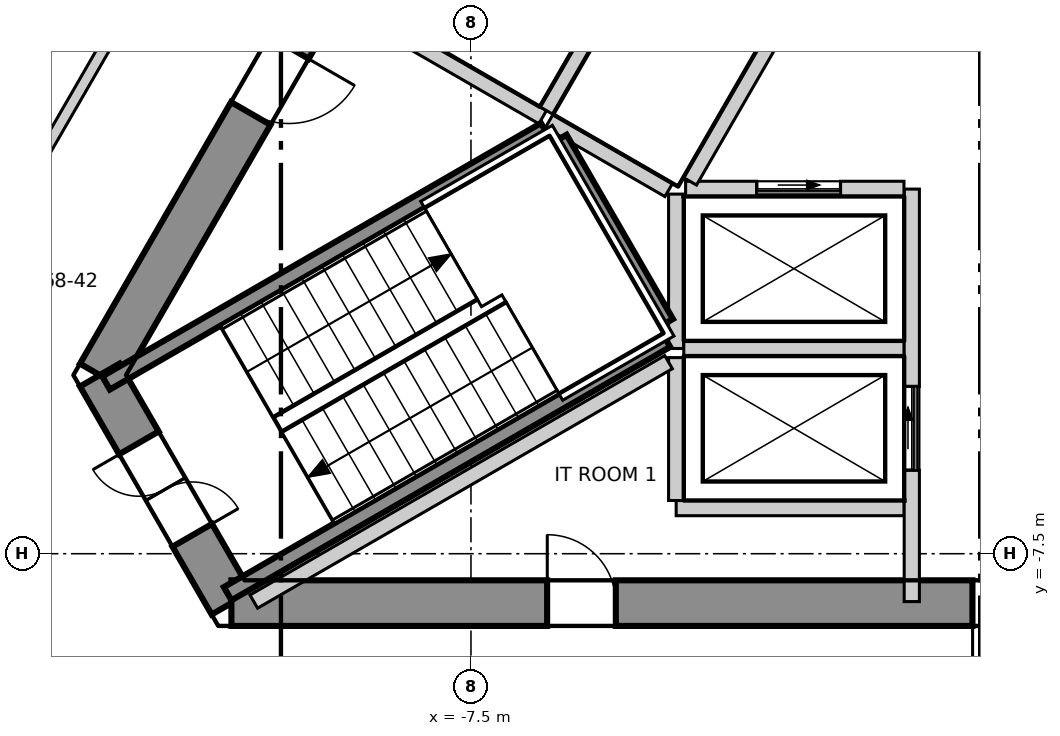
"""IFC4 building model, lengths in metres.
Left out: names, types, materials, properties, quantities, classifications, styles, units other than length and angle.
Written with IfcOpenShell. Run it as: python <this file> out.ifc"""

import sys

from ifc_helpers import new_model, si_unit, direction, frame, frame_2d, origin, place, context, subcontext, project, spatial, polyline, rectangle, outline, extrude, element, fill, save


model = new_model("IFC4")
c1 = context("Model", 3, precision=1e-05, world=origin(), true_north=direction((0.0, 1.0)))
c2 = subcontext(c1, "Body", "Model", "MODEL_VIEW")
j1 = project(units=[si_unit("LENGTHUNIT", "METRE"), si_unit("PLANEANGLEUNIT", "RADIAN")], contexts=[c1])
p1 = place(None, origin())
s1 = spatial("IfcSite", under=j1, at=p1, CompositionType="ELEMENT")
p2 = place(p1, origin())
s2 = spatial("IfcBuilding", under=s1, at=p2, CompositionType="ELEMENT")
p3 = place(p2, frame((0.0, 0.0, 289.9)))
s3 = spatial("IfcBuildingStorey", under=s2, at=p3, CompositionType="ELEMENT", Elevation=289.9)
p4 = place(p3, frame((-1.732, 13.3, -0.3), z_axis=(0.0, 0.0, 1.0), x_axis=(-0.500000539815, -0.866025092122, 0.0)))
e1 = element("IfcWall", 1, at=p4, inside=s3, PredefinedType="SHEAR", context=c2, shape_type="SweptSolid", body=[
    extrude(outline(polyline([(-0.173, -0.3), (1.795, -0.3), (3.763, -0.3), (5.732, -0.3), (7.7, -0.3), (9.668, -0.301), (11.637, -0.301), (13.605, -0.301), (15.573, -0.301), (17.542, -0.301), (19.51, -0.301), (21.478, -0.301), (21.131, 0.3), (19.226, 0.3), (17.321, 0.3), (15.415, 0.3), (13.51, 0.3), (11.605, 0.3), (9.699, 0.3), (7.794, 0.3), (5.889, 0.3), (3.984, 0.3), (2.078, 0.3), (0.173, 0.3), (-0.173, -0.3)])), origin(), (0.0, 0.0, 1.0), 3.6),
])
p5 = place(p4, frame((10.102, 0.0, 0.3)))
e2 = element("IfcOpeningElement", 2, at=p5, cuts=e1, PredefinedType="OPENING", context=c2, shape_type="SweptSolid", body=[
    extrude(rectangle(XDim=1.1, YDim=2.1, at=frame_2d((0.55, 1.05))), frame((0.0, 0.31, 0.0), z_axis=(0.0, -1.0, 0.0), x_axis=(1.0, 0.0, 0.0)), (0.0, 0.0, 1.0), 0.621),
])
p6 = place(p4, frame((16.328, 0.0, 0.3)))
e3 = element("IfcOpeningElement", 3, at=p6, cuts=e1, PredefinedType="OPENING", context=c2, shape_type="SweptSolid", body=[
    extrude(rectangle(XDim=1.0, YDim=2.1, at=frame_2d((0.5, 1.05))), frame((0.0, 0.31, 0.0), z_axis=(0.0, -1.0, 0.0), x_axis=(1.0, 0.0, 0.0)), (0.0, 0.0, 1.0), 0.621),
])
p7 = place(p4, frame((4.777, 0.0, 0.3)))
e4 = element("IfcOpeningElement", 4, at=p7, cuts=e1, PredefinedType="OPENING", context=c2, shape_type="SweptSolid", body=[
    extrude(rectangle(XDim=0.9, YDim=2.1, at=frame_2d((0.45, 1.05))), frame((0.0, 0.31, 0.0), z_axis=(0.0, -1.0, 0.0), x_axis=(1.0, 0.0, 0.0)), (0.0, 0.0, 1.0), 0.621),
])
p8 = place(p3, frame((-12.384, -5.15, -0.3), z_axis=(0.0, 0.0, 1.0), x_axis=(0.49997462182, -0.866040055388, 0.0)))
e5 = element("IfcWall", 5, at=p8, inside=s3, PredefinedType="SHEAR", context=c2, shape_type="SweptSolid", body=[
    extrude(outline(polyline([(-0.173, -0.301), (1.732, -0.301), (3.637, -0.3), (3.291, 0.3), (1.732, 0.3), (0.173, 0.3), (-0.173, -0.301)])), origin(), (0.0, 0.0, 1.0), 3.6),
])
p9 = place(p8, frame((1.032, 0.0, 0.3)))
e6 = element("IfcOpeningElement", 6, at=p9, cuts=e5, PredefinedType="OPENING", context=c2, shape_type="SweptSolid", body=[
    extrude(rectangle(XDim=1.4, YDim=2.1, at=frame_2d((0.7, 1.05))), frame((0.0, 0.31, 0.0), z_axis=(0.0, -1.0, 0.0), x_axis=(1.0, 0.0, 0.0)), (0.0, 0.0, 1.0), 0.621),
])
p10 = place(p3, frame((-10.652, -8.15, -0.3), z_axis=(0.0, 0.0, 1.0), x_axis=(1.0, 0.0, 0.0)))
e7 = element("IfcWall", 7, at=p10, inside=s3, PredefinedType="SHEAR", context=c2, shape_type="SweptSolid", body=[
    extrude(outline(polyline([(-0.173, -0.3), (1.795, -0.3), (3.763, -0.3), (5.731, -0.3), (7.7, -0.3), (9.668, -0.3), (11.636, -0.3), (13.604, -0.3), (15.573, -0.3), (17.541, -0.3), (19.509, -0.3), (21.477, -0.3), (21.131, 0.3), (19.226, 0.3), (17.321, 0.3), (15.415, 0.3), (13.51, 0.3), (11.605, 0.3), (9.699, 0.3), (7.794, 0.3), (5.889, 0.3), (3.984, 0.3), (2.078, 0.3), (0.173, 0.3), (-0.173, -0.3)])), origin(), (0.0, 0.0, 1.0), 3.6),
])
p11 = place(p10, frame((9.752, 0.0, 0.3)))
e8 = element("IfcOpeningElement", 8, at=p11, cuts=e7, PredefinedType="OPENING", context=c2, shape_type="SweptSolid", body=[
    extrude(rectangle(XDim=1.8, YDim=2.1, at=frame_2d((0.9, 1.05))), frame((0.0, 0.31, 0.0), z_axis=(0.0, -1.0, 0.0), x_axis=(1.0, 0.0, 0.0)), (0.0, 0.0, 1.0), 0.62),
])
p12 = place(p10, frame((4.156, 0.0, 0.3)))
e9 = element("IfcOpeningElement", 9, at=p12, cuts=e7, PredefinedType="OPENING", context=c2, shape_type="SweptSolid", body=[
    extrude(rectangle(XDim=0.9, YDim=2.1, at=frame_2d((0.45, 1.05))), frame((0.0, 0.31, 0.0), z_axis=(0.0, -1.0, 0.0), x_axis=(1.0, 0.0, 0.0)), (0.0, 0.0, 1.0), 0.62),
])
p13 = place(p3, frame((-2.494, 27.86, 0.0), z_axis=(0.0, 0.0, 1.0), x_axis=(-0.500008134474, -0.866020707292, 0.0)))
e10 = element("IfcWall", 10, at=p13, inside=s3, PredefinedType="ELEMENTEDWALL", context=c2, shape_type="SweptSolid", body=[
    extrude(rectangle(XDim=45.741, YDim=0.2, at=frame_2d((22.871, 0.0))), origin(), (0.0, 0.0, 1.0), 3.3),
])
p14 = place(p13, frame((2.15, 0.0, 0.9)))
e11 = element("IfcOpeningElement", 11, at=p14, cuts=e10, PredefinedType="OPENING", context=c2, shape_type="SweptSolid", body=[
    extrude(rectangle(XDim=3.7, YDim=2.2, at=frame_2d((1.85, 1.1))), frame((0.0, 0.11, 0.0), z_axis=(0.0, -1.0, 0.0), x_axis=(1.0, 0.0, 0.0)), (0.0, 0.0, 1.0), 0.22),
])
p15 = place(p13, frame((7.544, 0.0, 0.9)))
e12 = element("IfcOpeningElement", 12, at=p15, cuts=e10, PredefinedType="OPENING", context=c2, shape_type="SweptSolid", body=[
    extrude(rectangle(XDim=3.7, YDim=2.2, at=frame_2d((1.85, 1.1))), frame((0.0, 0.11, 0.0), z_axis=(0.0, -1.0, 0.0), x_axis=(1.0, 0.0, 0.0)), (0.0, 0.0, 1.0), 0.22),
])
p16 = place(p13, frame((12.939, 0.0, 0.9)))
e13 = element("IfcOpeningElement", 13, at=p16, cuts=e10, PredefinedType="OPENING", context=c2, shape_type="SweptSolid", body=[
    extrude(rectangle(XDim=3.7, YDim=2.2, at=frame_2d((1.85, 1.1))), frame((0.0, 0.11, 0.0), z_axis=(0.0, -1.0, 0.0), x_axis=(1.0, 0.0, 0.0)), (0.0, 0.0, 1.0), 0.22),
])
p17 = place(p13, frame((18.333, 0.0, 0.9)))
e14 = element("IfcOpeningElement", 14, at=p17, cuts=e10, PredefinedType="OPENING", context=c2, shape_type="SweptSolid", body=[
    extrude(rectangle(XDim=3.7, YDim=2.2, at=frame_2d((1.85, 1.1))), frame((0.0, 0.11, 0.0), z_axis=(0.0, -1.0, 0.0), x_axis=(1.0, 0.0, 0.0)), (0.0, 0.0, 1.0), 0.22),
])
p18 = place(p13, frame((23.728, 0.0, 0.9)))
e15 = element("IfcOpeningElement", 15, at=p18, cuts=e10, PredefinedType="OPENING", context=c2, shape_type="SweptSolid", body=[
    extrude(rectangle(XDim=3.7, YDim=2.2, at=frame_2d((1.85, 1.1))), frame((0.0, 0.11, 0.0), z_axis=(0.0, -1.0, 0.0), x_axis=(1.0, 0.0, 0.0)), (0.0, 0.0, 1.0), 0.22),
])
p19 = place(p13, frame((29.122, 0.0, 0.9)))
e16 = element("IfcOpeningElement", 16, at=p19, cuts=e10, PredefinedType="OPENING", context=c2, shape_type="SweptSolid", body=[
    extrude(rectangle(XDim=3.7, YDim=2.2, at=frame_2d((1.85, 1.1))), frame((0.0, 0.11, 0.0), z_axis=(0.0, -1.0, 0.0), x_axis=(1.0, 0.0, 0.0)), (0.0, 0.0, 1.0), 0.22),
])
p20 = place(p13, frame((34.517, 0.0, 0.9)))
e17 = element("IfcOpeningElement", 17, at=p20, cuts=e10, PredefinedType="OPENING", context=c2, shape_type="SweptSolid", body=[
    extrude(rectangle(XDim=3.7, YDim=2.2, at=frame_2d((1.85, 1.1))), frame((0.0, 0.11, 0.0), z_axis=(0.0, -1.0, 0.0), x_axis=(1.0, 0.0, 0.0)), (0.0, 0.0, 1.0), 0.22),
])
p21 = place(p13, frame((39.911, 0.0, 0.9)))
e18 = element("IfcOpeningElement", 18, at=p21, cuts=e10, PredefinedType="OPENING", context=c2, shape_type="SweptSolid", body=[
    extrude(rectangle(XDim=3.7, YDim=2.2, at=frame_2d((1.85, 1.1))), frame((0.0, 0.11, 0.0), z_axis=(0.0, -1.0, 0.0), x_axis=(1.0, 0.0, 0.0)), (0.0, 0.0, 1.0), 0.22),
])
p22 = place(p3, frame((-17.679, -10.12, 0.0), z_axis=(0.0, 0.0, 1.0), x_axis=(0.500008955215, 0.866020233427, 0.0)))
e19 = element("IfcWall", 19, at=p22, inside=s3, PredefinedType="PARTITIONING", context=c2, shape_type="SweptSolid", body=[
    extrude(rectangle(XDim=35.357, YDim=0.15, at=frame_2d((17.679, 0.0))), origin(), (0.0, 0.0, 1.0), 3.3),
])
p23 = place(p22, frame((31.407, 0.0, 0.0)))
e20 = element("IfcOpeningElement", 20, at=p23, cuts=e19, PredefinedType="OPENING", context=c2, shape_type="SweptSolid", body=[
    extrude(rectangle(XDim=1.0, YDim=2.1, at=frame_2d((0.5, 1.05))), frame((0.0, 0.085, 0.0), z_axis=(0.0, -1.0, 0.0), x_axis=(1.0, 0.0, 0.0)), (0.0, 0.0, 1.0), 0.17),
])
p24 = place(p22, frame((25.642, 0.0, 0.0)))
e21 = element("IfcOpeningElement", 21, at=p24, cuts=e19, PredefinedType="OPENING", context=c2, shape_type="SweptSolid", body=[
    extrude(rectangle(XDim=1.0, YDim=2.1, at=frame_2d((0.5, 1.05))), frame((0.0, 0.085, 0.0), z_axis=(0.0, -1.0, 0.0), x_axis=(1.0, 0.0, 0.0)), (0.0, 0.0, 1.0), 0.17),
])
p25 = place(p22, frame((18.348, 0.0, 0.0)))
e22 = element("IfcOpeningElement", 22, at=p25, cuts=e19, PredefinedType="OPENING", context=c2, shape_type="SweptSolid", body=[
    extrude(rectangle(XDim=1.0, YDim=2.1, at=frame_2d((0.5, 1.05))), frame((0.0, 0.085, 0.0), z_axis=(0.0, -1.0, 0.0), x_axis=(1.0, 0.0, 0.0)), (0.0, 0.0, 1.0), 0.17),
])
p26 = place(p22, frame((13.254, 0.0, 0.0)))
e23 = element("IfcOpeningElement", 23, at=p26, cuts=e19, PredefinedType="OPENING", context=c2, shape_type="SweptSolid", body=[
    extrude(rectangle(XDim=1.0, YDim=2.1, at=frame_2d((0.5, 1.05))), frame((0.0, 0.085, 0.0), z_axis=(0.0, -1.0, 0.0), x_axis=(1.0, 0.0, 0.0)), (0.0, 0.0, 1.0), 0.17),
])
p27 = place(p22, frame((7.559, 0.0, 0.0)))
e24 = element("IfcOpeningElement", 24, at=p27, cuts=e19, PredefinedType="OPENING", context=c2, shape_type="SweptSolid", body=[
    extrude(rectangle(XDim=1.0, YDim=2.1, at=frame_2d((0.5, 1.05))), frame((0.0, 0.085, 0.0), z_axis=(0.0, -1.0, 0.0), x_axis=(1.0, 0.0, 0.0)), (0.0, 0.0, 1.0), 0.17),
])
p28 = place(p22, frame((2.865, 0.0, 0.0)))
e25 = element("IfcOpeningElement", 25, at=p28, cuts=e19, PredefinedType="OPENING", context=c2, shape_type="SweptSolid", body=[
    extrude(rectangle(XDim=1.0, YDim=2.1, at=frame_2d((0.5, 1.05))), frame((0.0, 0.085, 0.0), z_axis=(0.0, -1.0, 0.0), x_axis=(1.0, 0.0, 0.0)), (0.0, 0.0, 1.0), 0.17),
])
p29 = place(p3, frame((-8.376, -0.707, 0.0), z_axis=(0.0, 0.0, 1.0), x_axis=(0.866067520717, -0.499927044236, 0.0)))
e26 = element("IfcWall", 26, at=p29, inside=s3, PredefinedType="SOLIDWALL", context=c2, shape_type="SweptSolid", body=[
    extrude(rectangle(XDim=2.1, YDim=0.2, at=frame_2d((1.05, 0.0))), origin(), (0.0, 0.0, 1.0), 3.3),
])
p30 = place(p3, frame((-4.8, -6.9, 0.0), z_axis=(0.0, 0.0, 1.0), x_axis=(1.0, 0.0, 0.0)))
e27 = element("IfcWall", 27, at=p30, inside=s3, PredefinedType="SOLIDWALL", context=c2, shape_type="SweptSolid", body=[
    extrude(rectangle(XDim=3.0, YDim=0.2, at=frame_2d((1.5, 0.0))), origin(), (0.0, 0.0, 1.0), 3.3),
])
p31 = place(p3, frame((-4.8, -6.8, 0.0), z_axis=(0.0, 0.0, 1.0), x_axis=(0.0, 1.0, 0.0)))
e28 = element("IfcWall", 28, at=p31, inside=s3, PredefinedType="SOLIDWALL", context=c2, shape_type="SweptSolid", body=[
    extrude(rectangle(XDim=1.88, YDim=0.2, at=frame_2d((0.94, 0.0))), origin(), (0.0, 0.0, 1.0), 3.3),
])
p32 = place(p3, frame((-4.8, -4.8, 0.0), z_axis=(0.0, 0.0, 1.0), x_axis=(0.0, 1.0, 0.0)))
e29 = element("IfcWall", 29, at=p32, inside=s3, PredefinedType="SOLIDWALL", context=c2, shape_type="SweptSolid", body=[
    extrude(rectangle(XDim=2.031, YDim=0.2, at=frame_2d((1.016, 0.0))), origin(), (0.0, 0.0, 1.0), 3.3),
])
p33 = place(p3, frame((-4.7, -4.8, 0.0), z_axis=(0.0, 0.0, 1.0), x_axis=(1.0, 0.0, 0.0)))
e30 = element("IfcWall", 30, at=p33, inside=s3, PredefinedType="SOLIDWALL", context=c2, shape_type="SweptSolid", body=[
    extrude(rectangle(XDim=2.9, YDim=0.2, at=frame_2d((1.45, 0.0))), origin(), (0.0, 0.0, 1.0), 3.3),
])
p34 = place(p3, frame((-1.7, -8.13, 0.0), z_axis=(0.0, 0.0, 1.0), x_axis=(0.0, 1.0, 0.0)))
e31 = element("IfcWall", 31, at=p34, inside=s3, PredefinedType="SOLIDWALL", context=c2, shape_type="SweptSolid", body=[
    extrude(rectangle(XDim=5.427, YDim=0.2, at=frame_2d((2.713, 0.0))), origin(), (0.0, 0.0, 1.0), 3.3),
])
p35 = place(p34, frame((1.73, 0.0, 0.0)))
e32 = element("IfcOpeningElement", 32, at=p35, cuts=e31, PredefinedType="OPENING", context=c2, shape_type="SweptSolid", body=[
    extrude(rectangle(XDim=1.1, YDim=2.1, at=frame_2d((0.55, 1.05))), frame((0.0, 0.11, 0.0), z_axis=(0.0, -1.0, 0.0), x_axis=(1.0, 0.0, 0.0)), (0.0, 0.0, 1.0), 0.22),
])
p36 = place(p3, frame((-4.676, -2.7, 0.0), z_axis=(0.0, 0.0, 1.0), x_axis=(1.0, 0.0, 0.0)))
e33 = element("IfcWall", 33, at=p36, inside=s3, PredefinedType="SOLIDWALL", context=c2, shape_type="SweptSolid", body=[
    extrude(rectangle(XDim=2.873, YDim=0.2, at=frame_2d((1.437, 0.0))), origin(), (0.0, 0.0, 1.0), 3.3),
])
p37 = place(p36, frame((0.937, 0.0, 0.0)))
e34 = element("IfcOpeningElement", 34, at=p37, cuts=e33, PredefinedType="OPENING", context=c2, shape_type="SweptSolid", body=[
    extrude(rectangle(XDim=1.1, YDim=2.1, at=frame_2d((0.55, 1.05))), frame((0.0, 0.11, 0.0), z_axis=(0.0, -1.0, 0.0), x_axis=(1.0, 0.0, 0.0)), (0.0, 0.0, 1.0), 0.22),
])
p38 = place(p3, frame((-6.507, -1.67, 0.0), z_axis=(0.0, 0.0, 1.0), x_axis=(0.50012328804, 0.865954211699, 0.0)))
e35 = element("IfcWall", 35, at=p38, inside=s3, PredefinedType="SOLIDWALL", context=c2, shape_type="SweptSolid", body=[
    extrude(rectangle(XDim=2.9, YDim=0.2, at=frame_2d((1.45, 0.0))), origin(), (0.0, 0.0, 1.0), 3.3),
])
p39 = place(p3, frame((-6.47, -1.807, 0.0), z_axis=(0.0, 0.0, 1.0), x_axis=(0.865883195159, -0.500246231712, 0.0)))
e36 = element("IfcWall", 36, at=p39, inside=s3, PredefinedType="SOLIDWALL", context=c2, shape_type="SweptSolid", body=[
    extrude(rectangle(XDim=1.815, YDim=0.2, at=frame_2d((0.908, 0.0))), origin(), (0.0, 0.0, 1.0), 3.3),
])
p40 = place(p3, frame((-4.619, -2.6, 0.0), z_axis=(0.0, 0.0, 1.0), x_axis=(0.50009492287, 0.865970593103, 0.0)))
e37 = element("IfcWall", 37, at=p40, inside=s3, PredefinedType="SOLIDWALL", context=c2, shape_type="SweptSolid", body=[
    extrude(rectangle(XDim=2.761, YDim=0.2, at=frame_2d((1.381, 0.0))), origin(), (0.0, 0.0, 1.0), 3.3),
])
p41 = place(p3, frame((-10.357, -8.13, 0.0), z_axis=(0.0, 0.0, 1.0), x_axis=(0.866074613031, 0.499914757397, 0.0)))
e38 = element("IfcWall", 38, at=p41, inside=s3, PredefinedType="SOLIDWALL", context=c2, shape_type="SweptSolid", body=[
    extrude(rectangle(XDim=6.301, YDim=0.2, at=frame_2d((3.15, 0.0))), origin(), (0.0, 0.0, 1.0), 3.3),
])
p42 = place(p3, frame((-12.301, -5.254, 0.0), z_axis=(0.0, 0.0, 1.0), x_axis=(0.866068467981, 0.499925403204, 0.0)))
e39 = element("IfcWall", 39, at=p42, inside=s3, PredefinedType="SOLIDWALL", context=c2, shape_type="SweptSolid", body=[
    extrude(rectangle(XDim=6.665, YDim=0.2, at=frame_2d((3.332, 0.0))), origin(), (0.0, 0.0, 1.0), 3.3),
])
p43 = place(p3, frame((-6.329, -2.038, 0.0), z_axis=(0.0, 0.0, 1.0), x_axis=(0.500200581029, -0.865909567298, 0.0)))
e40 = element("IfcWall", 40, at=p43, inside=s3, PredefinedType="SOLIDWALL", context=c2, shape_type="SweptSolid", body=[
    extrude(rectangle(XDim=2.799, YDim=0.2, at=frame_2d((1.399, 0.0))), origin(), (0.0, 0.0, 1.0), 3.3),
])
p44 = place(p3, frame((-10.701, -8.026, 0.0), z_axis=(0.0, 0.0, 1.0), x_axis=(0.866005022404, 0.500035299925, 0.0)))
e41 = element("IfcWall", 41, at=p44, inside=s3, PredefinedType="SOLIDWALL", context=c2, shape_type="SweptSolid", body=[
    extrude(rectangle(XDim=6.665, YDim=0.2, at=frame_2d((3.333, 0.0))), origin(), (0.0, 0.0, 1.0), 3.3),
])
p45 = place(p37, origin())
e42 = element("IfcDoor", 42, at=p45, inside=s3, OperationType="SLIDING_TO_LEFT", PredefinedType="DOOR", context=c2, shape_type="SweptSolid", body=[
    extrude(rectangle(XDim=1.1, YDim=2.1, at=frame_2d((0.55, 1.05))), frame((0.0, 0.025, 0.0), z_axis=(0.0, -1.0, 0.0), x_axis=(1.0, 0.0, 0.0)), (0.0, 0.0, 1.0), 0.05),
])
fill(e34, e42)
p46 = place(p35, origin())
e43 = element("IfcDoor", 43, at=p46, inside=s3, OperationType="SLIDING_TO_LEFT", PredefinedType="DOOR", context=c2, shape_type="SweptSolid", body=[
    extrude(rectangle(XDim=1.1, YDim=2.1, at=frame_2d((0.55, 1.05))), frame((0.0, 0.025, 0.0), z_axis=(0.0, -1.0, 0.0), x_axis=(1.0, 0.0, 0.0)), (0.0, 0.0, 1.0), 0.05),
])
fill(e32, e43)
p47 = place(p11, origin())
e44 = element("IfcDoor", 44, at=p47, inside=s3, OperationType="DOUBLE_DOOR_SINGLE_SWING", PredefinedType="DOOR", context=c2, shape_type="SweptSolid", body=[
    extrude(rectangle(XDim=1.8, YDim=2.1, at=frame_2d((0.9, 1.05))), frame((0.0, 0.025, 0.0), z_axis=(0.0, -1.0, 0.0), x_axis=(1.0, 0.0, 0.0)), (0.0, 0.0, 1.0), 0.05),
])
fill(e8, e44)
p48 = place(p9, origin())
e45 = element("IfcDoor", 45, at=p48, inside=s3, OperationType="DOUBLE_DOOR_SINGLE_SWING", PredefinedType="DOOR", context=c2, shape_type="SweptSolid", body=[
    extrude(rectangle(XDim=1.4, YDim=2.1, at=frame_2d((0.7, 1.05))), frame((0.0, 0.025, 0.0), z_axis=(0.0, -1.0, 0.0), x_axis=(1.0, 0.0, 0.0)), (0.0, 0.0, 1.0), 0.05),
])
fill(e6, e45)
p49 = place(p6, origin())
e46 = element("IfcDoor", 46, at=p49, inside=s3, OperationType="SINGLE_SWING_RIGHT", PredefinedType="DOOR", context=c2, shape_type="SweptSolid", body=[
    extrude(rectangle(XDim=1.0, YDim=2.1, at=frame_2d((0.5, 1.05))), frame((0.0, 0.025, 0.0), z_axis=(0.0, -1.0, 0.0), x_axis=(1.0, 0.0, 0.0)), (0.0, 0.0, 1.0), 0.05),
])
fill(e3, e46)
p50 = place(p12, origin())
e47 = element("IfcDoor", 47, at=p50, inside=s3, OperationType="SINGLE_SWING_RIGHT", PredefinedType="DOOR", context=c2, shape_type="SweptSolid", body=[
    extrude(rectangle(XDim=0.9, YDim=2.1, at=frame_2d((0.45, 1.05))), frame((0.0, 0.025, 0.0), z_axis=(0.0, -1.0, 0.0), x_axis=(1.0, 0.0, 0.0)), (0.0, 0.0, 1.0), 0.05),
])
fill(e9, e47)
save(model, sys.argv[1])
